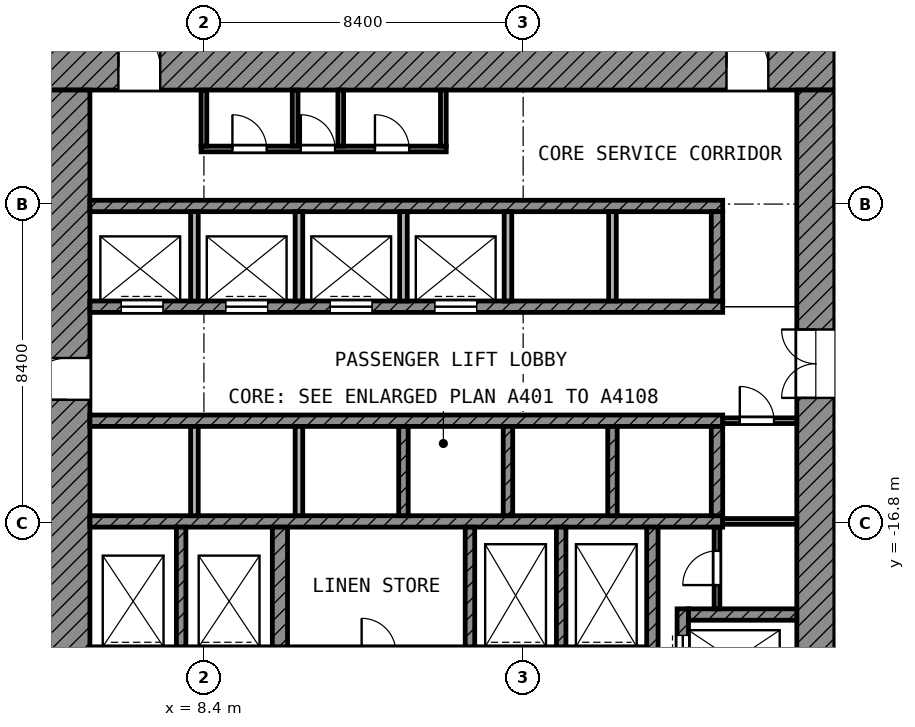
"""IFC4 building model, lengths in metres.
Left out: names, types, materials, properties, quantities, classifications, styles, units other than length and angle.
Written with IfcOpenShell. Run it as: python <this file> out.ifc"""

import sys

from ifc_helpers import new_model, si_unit, direction, frame, frame_2d, origin, place, context, subcontext, project, spatial, rectangle, extrude, element, fill, save


model = new_model("IFC4")
c1 = context("Model", 3, precision=1e-05, world=origin(), true_north=direction((0.0, 1.0)))
c2 = subcontext(c1, "Body", "Model", "MODEL_VIEW")
j1 = project(units=[si_unit("LENGTHUNIT", "METRE"), si_unit("PLANEANGLEUNIT", "RADIAN")], contexts=[c1])
p1 = place(None, origin())
s1 = spatial("IfcSite", under=j1, at=p1, CompositionType="ELEMENT")
p2 = place(p1, origin())
s2 = spatial("IfcBuilding", under=s1, at=p2, CompositionType="ELEMENT")
p3 = place(p2, frame((0.0, 0.0, 119.8)))
s3 = spatial("IfcBuildingStorey", under=s2, at=p3, CompositionType="ELEMENT", Elevation=119.8)
p4 = place(p3, frame((4.2, -4.8, 0.0), z_axis=(0.0, 0.0, 1.0), x_axis=(1.0, 0.0, 0.0)))
e1 = element("IfcWall", 1, at=p4, inside=s3, PredefinedType="SHEAR", context=c2, shape_type="SweptSolid", body=[
    extrude(rectangle(XDim=20.8, YDim=1.2, at=frame_2d((10.4, 0.0))), origin(), (0.0, 0.0, 1.0), 3.6),
])
p5 = place(p4, frame((1.95, 0.0, 0.0)))
e2 = element("IfcOpeningElement", 2, at=p5, cuts=e1, PredefinedType="OPENING", context=c2, shape_type="SweptSolid", body=[
    extrude(rectangle(XDim=1.1, YDim=2.1, at=frame_2d((0.55, 1.05))), frame((0.0, 0.61, 0.0), z_axis=(0.0, -1.0, 0.0), x_axis=(1.0, 0.0, 0.0)), (0.0, 0.0, 1.0), 1.22),
])
p6 = place(p4, frame((17.95, 0.0, 0.0)))
e3 = element("IfcOpeningElement", 3, at=p6, cuts=e1, PredefinedType="OPENING", context=c2, shape_type="SweptSolid", body=[
    extrude(rectangle(XDim=1.1, YDim=2.1, at=frame_2d((0.55, 1.05))), frame((0.0, 0.61, 0.0), z_axis=(0.0, -1.0, 0.0), x_axis=(1.0, 0.0, 0.0)), (0.0, 0.0, 1.0), 1.22),
])
p7 = place(p3, frame((4.8, -25.0, 0.0), z_axis=(0.0, 0.0, 1.0), x_axis=(0.0, 1.0, 0.0)))
e4 = element("IfcWall", 4, at=p7, inside=s3, PredefinedType="SHEAR", context=c2, shape_type="SweptSolid", body=[
    extrude(rectangle(XDim=19.6, YDim=1.2, at=frame_2d((9.8, 0.0))), origin(), (0.0, 0.0, 1.0), 3.6),
])
p8 = place(p7, frame((11.45, 0.0, 0.0)))
e5 = element("IfcOpeningElement", 5, at=p8, cuts=e4, PredefinedType="OPENING", context=c2, shape_type="SweptSolid", body=[
    extrude(rectangle(XDim=1.1, YDim=2.1, at=frame_2d((0.55, 1.05))), frame((0.0, 0.61, 0.0), z_axis=(0.0, -1.0, 0.0), x_axis=(1.0, 0.0, 0.0)), (0.0, 0.0, 1.0), 1.22),
])
p9 = place(p7, frame((2.15, 0.0, 0.0)))
e6 = element("IfcOpeningElement", 6, at=p9, cuts=e4, PredefinedType="OPENING", context=c2, shape_type="SweptSolid", body=[
    extrude(rectangle(XDim=1.1, YDim=2.1, at=frame_2d((0.55, 1.05))), frame((0.0, 0.61, 0.0), z_axis=(0.0, -1.0, 0.0), x_axis=(1.0, 0.0, 0.0)), (0.0, 0.0, 1.0), 1.22),
])
p10 = place(p3, frame((24.5, -24.0, 0.0), z_axis=(0.0, 0.0, 1.0), x_axis=(0.0, 1.0, 0.0)))
e7 = element("IfcWall", 7, at=p10, inside=s3, PredefinedType="SHEAR", context=c2, shape_type="SweptSolid", body=[
    extrude(rectangle(XDim=18.6, YDim=1.0, at=frame_2d((9.3, 0.0))), origin(), (0.0, 0.0, 1.0), 3.6),
])
p11 = place(p10, frame((10.5, 0.0, 0.0)))
e8 = element("IfcOpeningElement", 8, at=p11, cuts=e7, PredefinedType="OPENING", context=c2, shape_type="SweptSolid", body=[
    extrude(rectangle(XDim=1.8, YDim=2.1, at=frame_2d((0.9, 1.05))), frame((0.0, 0.51, 0.0), z_axis=(0.0, -1.0, 0.0), x_axis=(1.0, 0.0, 0.0)), (0.0, 0.0, 1.0), 1.02),
])
p12 = place(p3, frame((5.4, -8.45, 0.0), z_axis=(0.0, 0.0, 1.0), x_axis=(1.0, 0.0, 0.0)))
e9 = element("IfcWall", 9, at=p12, inside=s3, PredefinedType="SHEAR", context=c2, shape_type="SweptSolid", body=[
    extrude(rectangle(XDim=16.65, YDim=0.3, at=frame_2d((8.325, 0.0))), origin(), (0.0, 0.0, 1.0), 3.6),
])
p13 = place(p3, frame((5.4, -11.1, 0.0), z_axis=(0.0, 0.0, 1.0), x_axis=(1.0, 0.0, 0.0)))
e10 = element("IfcWall", 10, at=p13, inside=s3, PredefinedType="SHEAR", context=c2, shape_type="SweptSolid", body=[
    extrude(rectangle(XDim=16.65, YDim=0.3, at=frame_2d((8.325, 0.0))), origin(), (0.0, 0.0, 1.0), 3.6),
])
p14 = place(p13, frame((0.825, 0.0, 0.0)))
e11 = element("IfcOpeningElement", 11, at=p14, cuts=e10, PredefinedType="OPENING", context=c2, shape_type="SweptSolid", body=[
    extrude(rectangle(XDim=1.1, YDim=2.1, at=frame_2d((0.55, 1.05))), frame((0.0, 0.16, 0.0), z_axis=(0.0, -1.0, 0.0), x_axis=(1.0, 0.0, 0.0)), (0.0, 0.0, 1.0), 0.32),
])
p15 = place(p13, frame((3.575, 0.0, 0.0)))
e12 = element("IfcOpeningElement", 12, at=p15, cuts=e10, PredefinedType="OPENING", context=c2, shape_type="SweptSolid", body=[
    extrude(rectangle(XDim=1.1, YDim=2.1, at=frame_2d((0.55, 1.05))), frame((0.0, 0.16, 0.0), z_axis=(0.0, -1.0, 0.0), x_axis=(1.0, 0.0, 0.0)), (0.0, 0.0, 1.0), 0.32),
])
p16 = place(p13, frame((6.325, 0.0, 0.0)))
e13 = element("IfcOpeningElement", 13, at=p16, cuts=e10, PredefinedType="OPENING", context=c2, shape_type="SweptSolid", body=[
    extrude(rectangle(XDim=1.1, YDim=2.1, at=frame_2d((0.55, 1.05))), frame((0.0, 0.16, 0.0), z_axis=(0.0, -1.0, 0.0), x_axis=(1.0, 0.0, 0.0)), (0.0, 0.0, 1.0), 0.32),
])
p17 = place(p13, frame((9.075, 0.0, 0.0)))
e14 = element("IfcOpeningElement", 14, at=p17, cuts=e10, PredefinedType="OPENING", context=c2, shape_type="SweptSolid", body=[
    extrude(rectangle(XDim=1.1, YDim=2.1, at=frame_2d((0.55, 1.05))), frame((0.0, 0.16, 0.0), z_axis=(0.0, -1.0, 0.0), x_axis=(1.0, 0.0, 0.0)), (0.0, 0.0, 1.0), 0.32),
])
for number, where, z_axis, x_axis in (
    (15, (5.4, -14.1, 0.0), (0.0, 0.0, 1.0), (1.0, 0.0, 0.0)),
    (16, (5.4, -16.75, 0.0), (0.0, 0.0, 1.0), (1.0, 0.0, 0.0)),
):
    element("IfcWall", number, at=place(p3, frame(where, z_axis=z_axis, x_axis=x_axis)), inside=s3, PredefinedType="SHEAR", context=c2, shape_type="SweptSolid", body=[
        extrude(rectangle(XDim=16.65, YDim=0.3, at=frame_2d((8.325, 0.0))), origin(), (0.0, 0.0, 1.0), 3.6),
    ])
p18 = place(p3, frame((5.4, -20.2, 0.0), z_axis=(0.0, 0.0, 1.0), x_axis=(1.0, 0.0, 0.0)))
e17 = element("IfcWall", 17, at=p18, inside=s3, PredefinedType="SHEAR", context=c2, shape_type="SweptSolid", body=[
    extrude(rectangle(XDim=14.65, YDim=0.3, at=frame_2d((7.325, 0.0))), origin(), (0.0, 0.0, 1.0), 3.6),
])
p19 = place(p18, frame((10.55, 0.0, 0.0)))
e18 = element("IfcOpeningElement", 18, at=p19, cuts=e17, PredefinedType="OPENING", context=c2, shape_type="SweptSolid", body=[
    extrude(rectangle(XDim=1.3, YDim=2.1, at=frame_2d((0.65, 1.05))), frame((0.0, 0.16, 0.0), z_axis=(0.0, -1.0, 0.0), x_axis=(1.0, 0.0, 0.0)), (0.0, 0.0, 1.0), 0.32),
])
p20 = place(p18, frame((12.95, 0.0, 0.0)))
e19 = element("IfcOpeningElement", 19, at=p20, cuts=e17, PredefinedType="OPENING", context=c2, shape_type="SweptSolid", body=[
    extrude(rectangle(XDim=1.3, YDim=2.1, at=frame_2d((0.65, 1.05))), frame((0.0, 0.16, 0.0), z_axis=(0.0, -1.0, 0.0), x_axis=(1.0, 0.0, 0.0)), (0.0, 0.0, 1.0), 0.32),
])
p21 = place(p18, frame((0.55, 0.0, 0.0)))
e20 = element("IfcOpeningElement", 20, at=p21, cuts=e17, PredefinedType="OPENING", context=c2, shape_type="SweptSolid", body=[
    extrude(rectangle(XDim=1.3, YDim=2.1, at=frame_2d((0.65, 1.05))), frame((0.0, 0.16, 0.0), z_axis=(0.0, -1.0, 0.0), x_axis=(1.0, 0.0, 0.0)), (0.0, 0.0, 1.0), 0.32),
])
p22 = place(p18, frame((2.95, 0.0, 0.0)))
e21 = element("IfcOpeningElement", 21, at=p22, cuts=e17, PredefinedType="OPENING", context=c2, shape_type="SweptSolid", body=[
    extrude(rectangle(XDim=1.3, YDim=2.1, at=frame_2d((0.65, 1.05))), frame((0.0, 0.16, 0.0), z_axis=(0.0, -1.0, 0.0), x_axis=(1.0, 0.0, 0.0)), (0.0, 0.0, 1.0), 0.32),
])
p23 = place(p18, frame((7.15, 0.0, 0.0)))
e22 = element("IfcOpeningElement", 22, at=p23, cuts=e17, PredefinedType="OPENING", context=c2, shape_type="SweptSolid", body=[
    extrude(rectangle(XDim=0.9, YDim=2.1, at=frame_2d((0.45, 1.05))), frame((0.0, 0.16, 0.0), z_axis=(0.0, -1.0, 0.0), x_axis=(1.0, 0.0, 0.0)), (0.0, 0.0, 1.0), 0.32),
])
p24 = place(p3, frame((10.4, -20.05, 0.0), z_axis=(0.0, 0.0, 1.0), x_axis=(0.0, 1.0, 0.0)))
e23 = element("IfcWall", 23, at=p24, inside=s3, PredefinedType="SHEAR", context=c2, shape_type="SweptSolid", body=[
    extrude(rectangle(XDim=3.15, YDim=0.4, at=frame_2d((1.575, 0.0))), origin(), (0.0, 0.0, 1.0), 3.6),
])
p25 = place(p3, frame((20.2, -20.35, 0.0), z_axis=(0.0, 0.0, 1.0), x_axis=(0.0, 1.0, 0.0)))
e24 = element("IfcWall", 24, at=p25, inside=s3, PredefinedType="SHEAR", context=c2, shape_type="SweptSolid", body=[
    extrude(rectangle(XDim=3.45, YDim=0.3, at=frame_2d((1.725, 0.0))), origin(), (0.0, 0.0, 1.0), 3.6),
])
p26 = place(p3, frame((21.9, -10.95, 0.0), z_axis=(0.0, 0.0, 1.0), x_axis=(0.0, 1.0, 0.0)))
e25 = element("IfcWall", 25, at=p26, inside=s3, PredefinedType="SHEAR", context=c2, shape_type="SweptSolid", body=[
    extrude(rectangle(XDim=2.35, YDim=0.3, at=frame_2d((1.175, 0.0))), origin(), (0.0, 0.0, 1.0), 3.6),
])
p27 = place(p3, frame((21.9, -16.6, 0.0), z_axis=(0.0, 0.0, 1.0), x_axis=(0.0, 1.0, 0.0)))
e26 = element("IfcWall", 26, at=p27, inside=s3, PredefinedType="SHEAR", context=c2, shape_type="SweptSolid", body=[
    extrude(rectangle(XDim=2.35, YDim=0.3, at=frame_2d((1.175, 0.0))), origin(), (0.0, 0.0, 1.0), 3.6),
])
p28 = place(p3, frame((21.15, -19.2, 0.0), z_axis=(0.0, 0.0, 1.0), x_axis=(1.0, 0.0, 0.0)))
e27 = element("IfcWall", 27, at=p28, inside=s3, PredefinedType="SHEAR", context=c2, shape_type="SweptSolid", body=[
    extrude(rectangle(XDim=2.85, YDim=0.3, at=frame_2d((1.425, 0.0))), origin(), (0.0, 0.0, 1.0), 3.6),
])
p29 = place(p3, frame((21.0, -24.0, 0.0), z_axis=(0.0, 0.0, 1.0), x_axis=(0.0, 1.0, 0.0)))
e28 = element("IfcWall", 28, at=p29, inside=s3, PredefinedType="SHEAR", context=c2, shape_type="SweptSolid", body=[
    extrude(rectangle(XDim=4.95, YDim=0.3, at=frame_2d((2.475, 0.0))), origin(), (0.0, 0.0, 1.0), 3.6),
])
p30 = place(p29, frame((2.95, 0.0, 0.0)))
e29 = element("IfcOpeningElement", 29, at=p30, cuts=e28, PredefinedType="OPENING", context=c2, shape_type="SweptSolid", body=[
    extrude(rectangle(XDim=1.3, YDim=2.1, at=frame_2d((0.65, 1.05))), frame((0.0, 0.16, 0.0), z_axis=(0.0, -1.0, 0.0), x_axis=(1.0, 0.0, 0.0)), (0.0, 0.0, 1.0), 0.32),
])
p31 = place(p29, frame((0.55, 0.0, 0.0)))
e30 = element("IfcOpeningElement", 30, at=p31, cuts=e28, PredefinedType="OPENING", context=c2, shape_type="SweptSolid", body=[
    extrude(rectangle(XDim=1.3, YDim=2.1, at=frame_2d((0.65, 1.05))), frame((0.0, 0.16, 0.0), z_axis=(0.0, -1.0, 0.0), x_axis=(1.0, 0.0, 0.0)), (0.0, 0.0, 1.0), 0.32),
])
for number, where, z_axis, x_axis in (
    (31, (7.8, -20.05, 0.0), (0.0, 0.0, 1.0), (0.0, 1.0, 0.0)),
    (32, (15.4, -20.05, 0.0), (0.0, 0.0, 1.0), (0.0, 1.0, 0.0)),
    (33, (17.8, -20.05, 0.0), (0.0, 0.0, 1.0), (0.0, 1.0, 0.0)),
):
    element("IfcWall", number, at=place(p3, frame(where, z_axis=z_axis, x_axis=x_axis)), inside=s3, PredefinedType="SHEAR", context=c2, shape_type="SweptSolid", body=[
        extrude(rectangle(XDim=3.15, YDim=0.25, at=frame_2d((1.575, 0.0))), origin(), (0.0, 0.0, 1.0), 3.6),
    ])
for number, where, z_axis, x_axis in (
    (34, (8.15, -10.95, 0.0), (0.0, 0.0, 1.0), (0.0, 1.0, 0.0)),
    (35, (10.9, -10.95, 0.0), (0.0, 0.0, 1.0), (0.0, 1.0, 0.0)),
    (36, (13.65, -10.95, 0.0), (0.0, 0.0, 1.0), (0.0, 1.0, 0.0)),
    (37, (16.4, -10.95, 0.0), (0.0, 0.0, 1.0), (0.0, 1.0, 0.0)),
    (38, (19.15, -10.95, 0.0), (0.0, 0.0, 1.0), (0.0, 1.0, 0.0)),
):
    element("IfcWall", number, at=place(p3, frame(where, z_axis=z_axis, x_axis=x_axis)), inside=s3, PredefinedType="PARTITIONING", context=c2, shape_type="SweptSolid", body=[
        extrude(rectangle(XDim=2.35, YDim=0.2, at=frame_2d((1.175, 0.0))), origin(), (0.0, 0.0, 1.0), 3.6),
    ])
for number, where, z_axis, x_axis in (
    (39, (8.15, -16.6, 0.0), (0.0, 0.0, 1.0), (0.0, 1.0, 0.0)),
    (40, (10.9, -16.6, 0.0), (0.0, 0.0, 1.0), (0.0, 1.0, 0.0)),
):
    element("IfcWall", number, at=place(p3, frame(where, z_axis=z_axis, x_axis=x_axis)), inside=s3, PredefinedType="PARTITIONING", context=c2, shape_type="SweptSolid", body=[
        extrude(rectangle(XDim=2.35, YDim=0.2, at=frame_2d((1.175, 0.0))), origin(), (0.0, 0.0, 1.0), 3.6),
    ])
for number, where, z_axis, x_axis in (
    (41, (13.65, -16.6, 0.0), (0.0, 0.0, 1.0), (0.0, 1.0, 0.0)),
    (42, (16.4, -16.6, 0.0), (0.0, 0.0, 1.0), (0.0, 1.0, 0.0)),
    (43, (19.15, -16.6, 0.0), (0.0, 0.0, 1.0), (0.0, 1.0, 0.0)),
):
    element("IfcWall", number, at=place(p3, frame(where, z_axis=z_axis, x_axis=x_axis)), inside=s3, PredefinedType="SHEAR", context=c2, shape_type="SweptSolid", body=[
        extrude(rectangle(XDim=2.35, YDim=0.25, at=frame_2d((1.175, 0.0))), origin(), (0.0, 0.0, 1.0), 3.6),
    ])
p32 = place(p3, frame((21.9, -19.05, 0.0), z_axis=(0.0, 0.0, 1.0), x_axis=(0.0, 1.0, 0.0)))
e44 = element("IfcWall", 44, at=p32, inside=s3, PredefinedType="PARTITIONING", context=c2, shape_type="SweptSolid", body=[
    extrude(rectangle(XDim=2.15, YDim=0.15, at=frame_2d((1.075, 0.0))), origin(), (0.0, 0.0, 1.0), 3.6),
])
p33 = place(p32, frame((0.625, 0.0, 0.0)))
e45 = element("IfcOpeningElement", 45, at=p33, cuts=e44, PredefinedType="OPENING", context=c2, shape_type="SweptSolid", body=[
    extrude(rectangle(XDim=0.9, YDim=2.1, at=frame_2d((0.45, 1.05))), frame((0.0, 0.085, 0.0), z_axis=(0.0, -1.0, 0.0), x_axis=(1.0, 0.0, 0.0)), (0.0, 0.0, 1.0), 0.17),
])
p34 = place(p3, frame((22.05, -16.75, 0.0), z_axis=(0.0, 0.0, 1.0), x_axis=(1.0, 0.0, 0.0)))
e46 = element("IfcWall", 46, at=p34, inside=s3, PredefinedType="PARTITIONING", context=c2, shape_type="SweptSolid", body=[
    extrude(rectangle(XDim=1.95, YDim=0.15, at=frame_2d((0.975, 0.0))), origin(), (0.0, 0.0, 1.0), 3.6),
])
p35 = place(p3, frame((22.05, -14.1, 0.0), z_axis=(0.0, 0.0, 1.0), x_axis=(1.0, 0.0, 0.0)))
e47 = element("IfcWall", 47, at=p35, inside=s3, PredefinedType="PARTITIONING", context=c2, shape_type="SweptSolid", body=[
    extrude(rectangle(XDim=1.95, YDim=0.15, at=frame_2d((0.975, 0.0))), origin(), (0.0, 0.0, 1.0), 3.6),
])
p36 = place(p35, frame((0.45, 0.0, 0.0)))
e48 = element("IfcOpeningElement", 48, at=p36, cuts=e47, PredefinedType="OPENING", context=c2, shape_type="SweptSolid", body=[
    extrude(rectangle(XDim=0.9, YDim=2.1, at=frame_2d((0.45, 1.05))), frame((0.0, 0.085, 0.0), z_axis=(0.0, -1.0, 0.0), x_axis=(1.0, 0.0, 0.0)), (0.0, 0.0, 1.0), 0.17),
])
p37 = place(p3, frame((8.325, -6.95, 0.0), z_axis=(0.0, 0.0, 1.0), x_axis=(1.0, 0.0, 0.0)))
e49 = element("IfcWall", 49, at=p37, inside=s3, PredefinedType="PARTITIONING", context=c2, shape_type="SweptSolid", body=[
    extrude(rectangle(XDim=6.45, YDim=0.15, at=frame_2d((3.225, 0.0))), origin(), (0.0, 0.0, 1.0), 3.6),
])
p38 = place(p37, frame((0.825, 0.0, 0.0)))
e50 = element("IfcOpeningElement", 50, at=p38, cuts=e49, PredefinedType="OPENING", context=c2, shape_type="SweptSolid", body=[
    extrude(rectangle(XDim=0.9, YDim=2.1, at=frame_2d((0.45, 1.05))), frame((0.0, 0.085, 0.0), z_axis=(0.0, -1.0, 0.0), x_axis=(1.0, 0.0, 0.0)), (0.0, 0.0, 1.0), 0.17),
])
p39 = place(p37, frame((2.625, 0.0, 0.0)))
e51 = element("IfcOpeningElement", 51, at=p39, cuts=e49, PredefinedType="OPENING", context=c2, shape_type="SweptSolid", body=[
    extrude(rectangle(XDim=0.9, YDim=2.1, at=frame_2d((0.45, 1.05))), frame((0.0, 0.085, 0.0), z_axis=(0.0, -1.0, 0.0), x_axis=(1.0, 0.0, 0.0)), (0.0, 0.0, 1.0), 0.17),
])
p40 = place(p37, frame((4.575, 0.0, 0.0)))
e52 = element("IfcOpeningElement", 52, at=p40, cuts=e49, PredefinedType="OPENING", context=c2, shape_type="SweptSolid", body=[
    extrude(rectangle(XDim=0.9, YDim=2.1, at=frame_2d((0.45, 1.05))), frame((0.0, 0.085, 0.0), z_axis=(0.0, -1.0, 0.0), x_axis=(1.0, 0.0, 0.0)), (0.0, 0.0, 1.0), 0.17),
])
for number, where, z_axis, x_axis in (
    (53, (8.4, -6.875, 0.0), (0.0, 0.0, 1.0), (0.0, 1.0, 0.0)),
    (54, (10.8, -6.875, 0.0), (0.0, 0.0, 1.0), (0.0, 1.0, 0.0)),
    (55, (12.0, -6.875, 0.0), (0.0, 0.0, 1.0), (0.0, 1.0, 0.0)),
    (56, (14.7, -6.875, 0.0), (0.0, 0.0, 1.0), (0.0, 1.0, 0.0)),
):
    element("IfcWall", number, at=place(p3, frame(where, z_axis=z_axis, x_axis=x_axis)), inside=s3, PredefinedType="PARTITIONING", context=c2, shape_type="SweptSolid", body=[
        extrude(rectangle(XDim=1.475, YDim=0.15, at=frame_2d((0.738, 0.0))), origin(), (0.0, 0.0, 1.0), 3.6),
    ])
p41 = place(p14, origin())
e57 = element("IfcDoor", 57, at=p41, inside=s3, OperationType="DOUBLE_DOOR_SLIDING", PredefinedType="DOOR", context=c2, shape_type="SweptSolid", body=[
    extrude(rectangle(XDim=1.1, YDim=2.1, at=frame_2d((0.55, 1.05))), frame((0.0, 0.025, 0.0), z_axis=(0.0, -1.0, 0.0), x_axis=(1.0, 0.0, 0.0)), (0.0, 0.0, 1.0), 0.05),
])
fill(e11, e57)
p42 = place(p15, origin())
e58 = element("IfcDoor", 58, at=p42, inside=s3, OperationType="DOUBLE_DOOR_SLIDING", PredefinedType="DOOR", context=c2, shape_type="SweptSolid", body=[
    extrude(rectangle(XDim=1.1, YDim=2.1, at=frame_2d((0.55, 1.05))), frame((0.0, 0.025, 0.0), z_axis=(0.0, -1.0, 0.0), x_axis=(1.0, 0.0, 0.0)), (0.0, 0.0, 1.0), 0.05),
])
fill(e12, e58)
p43 = place(p16, origin())
e59 = element("IfcDoor", 59, at=p43, inside=s3, OperationType="DOUBLE_DOOR_SLIDING", PredefinedType="DOOR", context=c2, shape_type="SweptSolid", body=[
    extrude(rectangle(XDim=1.1, YDim=2.1, at=frame_2d((0.55, 1.05))), frame((0.0, 0.025, 0.0), z_axis=(0.0, -1.0, 0.0), x_axis=(1.0, 0.0, 0.0)), (0.0, 0.0, 1.0), 0.05),
])
fill(e13, e59)
p44 = place(p17, origin())
e60 = element("IfcDoor", 60, at=p44, inside=s3, OperationType="DOUBLE_DOOR_SLIDING", PredefinedType="DOOR", context=c2, shape_type="SweptSolid", body=[
    extrude(rectangle(XDim=1.1, YDim=2.1, at=frame_2d((0.55, 1.05))), frame((0.0, 0.025, 0.0), z_axis=(0.0, -1.0, 0.0), x_axis=(1.0, 0.0, 0.0)), (0.0, 0.0, 1.0), 0.05),
])
fill(e14, e60)
p45 = place(p30, origin())
e61 = element("IfcDoor", 61, at=p45, inside=s3, OperationType="DOUBLE_DOOR_SLIDING", PredefinedType="DOOR", context=c2, shape_type="SweptSolid", body=[
    extrude(rectangle(XDim=1.3, YDim=2.1, at=frame_2d((0.65, 1.05))), frame((0.0, 0.025, 0.0), z_axis=(0.0, -1.0, 0.0), x_axis=(1.0, 0.0, 0.0)), (0.0, 0.0, 1.0), 0.05),
])
fill(e29, e61)
p46 = place(p8, origin())
e62 = element("IfcDoor", 62, at=p46, inside=s3, OperationType="SINGLE_SWING_LEFT", PredefinedType="DOOR", context=c2, shape_type="SweptSolid", body=[
    extrude(rectangle(XDim=1.1, YDim=2.1, at=frame_2d((0.55, 1.05))), frame((0.0, 0.025, 0.0), z_axis=(0.0, -1.0, 0.0), x_axis=(1.0, 0.0, 0.0)), (0.0, 0.0, 1.0), 0.05),
])
fill(e5, e62)
p47 = place(p5, origin())
e63 = element("IfcDoor", 63, at=p47, inside=s3, OperationType="SINGLE_SWING_LEFT", PredefinedType="DOOR", context=c2, shape_type="SweptSolid", body=[
    extrude(rectangle(XDim=1.1, YDim=2.1, at=frame_2d((0.55, 1.05))), frame((0.0, 0.025, 0.0), z_axis=(0.0, -1.0, 0.0), x_axis=(1.0, 0.0, 0.0)), (0.0, 0.0, 1.0), 0.05),
])
fill(e2, e63)
p48 = place(p6, origin())
e64 = element("IfcDoor", 64, at=p48, inside=s3, OperationType="SINGLE_SWING_LEFT", PredefinedType="DOOR", context=c2, shape_type="SweptSolid", body=[
    extrude(rectangle(XDim=1.1, YDim=2.1, at=frame_2d((0.55, 1.05))), frame((0.0, 0.025, 0.0), z_axis=(0.0, -1.0, 0.0), x_axis=(1.0, 0.0, 0.0)), (0.0, 0.0, 1.0), 0.05),
])
fill(e3, e64)
p49 = place(p11, origin())
e65 = element("IfcDoor", 65, at=p49, inside=s3, OperationType="DOUBLE_DOOR_SINGLE_SWING", PredefinedType="DOOR", context=c2, shape_type="SweptSolid", body=[
    extrude(rectangle(XDim=1.8, YDim=2.1, at=frame_2d((0.9, 1.05))), frame((0.0, 0.025, 0.0), z_axis=(0.0, -1.0, 0.0), x_axis=(1.0, 0.0, 0.0)), (0.0, 0.0, 1.0), 0.05),
])
fill(e8, e65)
p50 = place(p38, origin())
e66 = element("IfcDoor", 66, at=p50, inside=s3, OperationType="SINGLE_SWING_LEFT", PredefinedType="DOOR", context=c2, shape_type="SweptSolid", body=[
    extrude(rectangle(XDim=0.9, YDim=2.1, at=frame_2d((0.45, 1.05))), frame((0.0, 0.025, 0.0), z_axis=(0.0, -1.0, 0.0), x_axis=(1.0, 0.0, 0.0)), (0.0, 0.0, 1.0), 0.05),
])
fill(e50, e66)
p51 = place(p39, origin())
e67 = element("IfcDoor", 67, at=p51, inside=s3, OperationType="SINGLE_SWING_LEFT", PredefinedType="DOOR", context=c2, shape_type="SweptSolid", body=[
    extrude(rectangle(XDim=0.9, YDim=2.1, at=frame_2d((0.45, 1.05))), frame((0.0, 0.025, 0.0), z_axis=(0.0, -1.0, 0.0), x_axis=(1.0, 0.0, 0.0)), (0.0, 0.0, 1.0), 0.05),
])
fill(e51, e67)
p52 = place(p40, origin())
e68 = element("IfcDoor", 68, at=p52, inside=s3, OperationType="SINGLE_SWING_LEFT", PredefinedType="DOOR", context=c2, shape_type="SweptSolid", body=[
    extrude(rectangle(XDim=0.9, YDim=2.1, at=frame_2d((0.45, 1.05))), frame((0.0, 0.025, 0.0), z_axis=(0.0, -1.0, 0.0), x_axis=(1.0, 0.0, 0.0)), (0.0, 0.0, 1.0), 0.05),
])
fill(e52, e68)
p53 = place(p36, origin())
e69 = element("IfcDoor", 69, at=p53, inside=s3, OperationType="SINGLE_SWING_LEFT", PredefinedType="DOOR", context=c2, shape_type="SweptSolid", body=[
    extrude(rectangle(XDim=0.9, YDim=2.1, at=frame_2d((0.45, 1.05))), frame((0.0, 0.025, 0.0), z_axis=(0.0, -1.0, 0.0), x_axis=(1.0, 0.0, 0.0)), (0.0, 0.0, 1.0), 0.05),
])
fill(e48, e69)
p54 = place(p33, origin())
e70 = element("IfcDoor", 70, at=p54, inside=s3, OperationType="SINGLE_SWING_LEFT", PredefinedType="DOOR", context=c2, shape_type="SweptSolid", body=[
    extrude(rectangle(XDim=0.9, YDim=2.1, at=frame_2d((0.45, 1.05))), frame((0.0, 0.025, 0.0), z_axis=(0.0, -1.0, 0.0), x_axis=(1.0, 0.0, 0.0)), (0.0, 0.0, 1.0), 0.05),
])
fill(e45, e70)
save(model, sys.argv[1])
